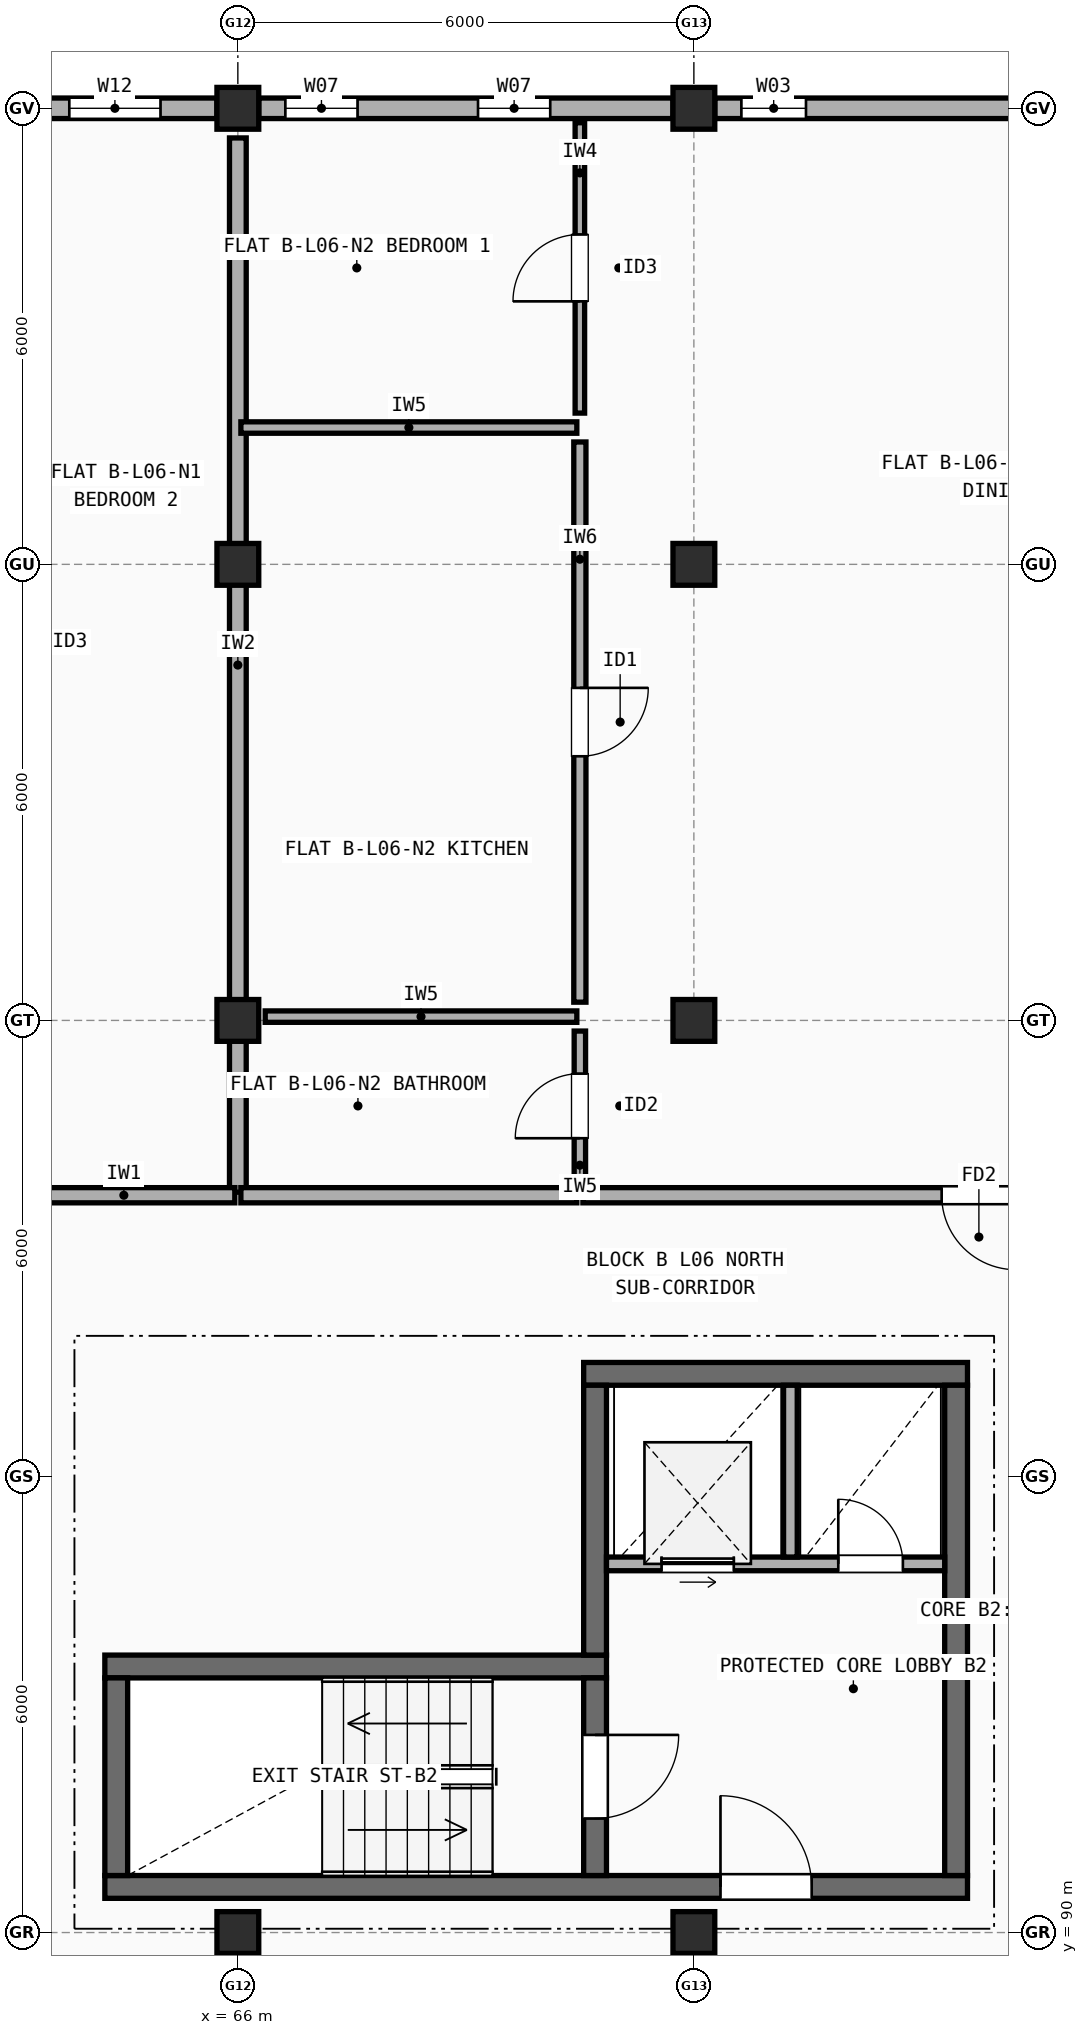
"""IFC4 building model, lengths in metres.
Left out: names, types, materials, properties, quantities, classifications, styles, units other than length and angle.
Written with IfcOpenShell. Run it as: python <this file> out.ifc"""

import sys

from ifc_helpers import new_model, si_unit, direction, frame, frame_2d, origin, origin_2d, place, context, subcontext, project, spatial, rectangle, extrude, element, fill, save


model = new_model("IFC4")
c1 = context("Model", 3, precision=1e-05, world=origin(), true_north=direction((0.0, 1.0)))
c2 = subcontext(c1, "Body", "Model", "MODEL_VIEW")
j1 = project(units=[si_unit("LENGTHUNIT", "METRE"), si_unit("PLANEANGLEUNIT", "RADIAN")], contexts=[c1])
p1 = place(None, origin())
s1 = spatial("IfcSite", under=j1, at=p1, CompositionType="ELEMENT")
p2 = place(p1, origin())
s2 = spatial("IfcBuilding", under=s1, at=p2, CompositionType="ELEMENT")
p3 = place(p2, frame((0.0, 0.0, 20.5)))
s3 = spatial("IfcBuildingStorey", under=s2, at=p3, CompositionType="ELEMENT", Elevation=20.5)
for number, where, z_axis, x_axis in (
    (1, (66.0, 90.0, 0.0), (0.0, 0.0, 1.0), (1.0, 0.0, 0.0)),
    (2, (66.0, 102.0, 0.0), (0.0, 0.0, 1.0), (1.0, 0.0, 0.0)),
    (3, (66.0, 108.0, 0.0), (0.0, 0.0, 1.0), (1.0, 0.0, 0.0)),
    (4, (66.0, 114.0, 0.0), (0.0, 0.0, 1.0), (1.0, 0.0, 0.0)),
    (5, (72.0, 90.0, 0.0), (0.0, 0.0, 1.0), (1.0, 0.0, 0.0)),
    (6, (72.0, 102.0, 0.0), (0.0, 0.0, 1.0), (1.0, 0.0, 0.0)),
    (7, (72.0, 108.0, 0.0), (0.0, 0.0, 1.0), (1.0, 0.0, 0.0)),
    (8, (72.0, 114.0, 0.0), (0.0, 0.0, 1.0), (1.0, 0.0, 0.0)),
):
    element("IfcColumn", number, at=place(p3, frame(where, z_axis=z_axis, x_axis=x_axis)), inside=s3, PredefinedType="COLUMN", context=c2, shape_type="SweptSolid", body=[
        extrude(rectangle(XDim=0.55, YDim=0.55, at=origin_2d()), origin(), (0.0, 0.0, 1.0), 2.97),
    ])
p4 = place(p3, frame((77.75, 114.0, 0.0), z_axis=(0.0, 0.0, 1.0), x_axis=(-1.0, 0.0, 0.0)))
e9 = element("IfcWall", 9, at=p4, inside=s3, PredefinedType="STANDARD", context=c2, shape_type="SweptSolid", body=[
    extrude(rectangle(XDim=5.475, YDim=0.27, at=frame_2d((2.738, 0.0))), origin(), (0.0, 0.0, 1.0), 2.452),
])
p5 = place(p4, frame((0.35, 0.0, 0.9)))
e10 = element("IfcOpeningElement", 10, at=p5, cuts=e9, PredefinedType="OPENING", context=c2, shape_type="SweptSolid", body=[
    extrude(rectangle(XDim=0.85, YDim=1.25, at=frame_2d((0.425, 0.625))), frame((0.0, 0.145, 0.0), z_axis=(0.0, -1.0, 0.0), x_axis=(1.0, 0.0, 0.0)), (0.0, 0.0, 1.0), 0.29),
])
p6 = place(p4, frame((4.275, 0.0, 0.9)))
e11 = element("IfcOpeningElement", 11, at=p6, cuts=e9, PredefinedType="OPENING", context=c2, shape_type="SweptSolid", body=[
    extrude(rectangle(XDim=0.85, YDim=1.25, at=frame_2d((0.425, 0.625))), frame((0.0, 0.145, 0.0), z_axis=(0.0, -1.0, 0.0), x_axis=(1.0, 0.0, 0.0)), (0.0, 0.0, 1.0), 0.29),
])
p7 = place(p3, frame((71.725, 114.0, 0.0), z_axis=(0.0, 0.0, 1.0), x_axis=(-1.0, 0.0, 0.0)))
e12 = element("IfcWall", 12, at=p7, inside=s3, PredefinedType="STANDARD", context=c2, shape_type="SweptSolid", body=[
    extrude(rectangle(XDim=5.45, YDim=0.27, at=frame_2d((2.725, 0.0))), origin(), (0.0, 0.0, 1.0), 2.452),
])
p8 = place(p7, frame((1.615, 0.0, 0.9)))
e13 = element("IfcOpeningElement", 13, at=p8, cuts=e12, PredefinedType="OPENING", context=c2, shape_type="SweptSolid", body=[
    extrude(rectangle(XDim=0.95, YDim=1.35, at=frame_2d((0.475, 0.675))), frame((0.0, 0.145, 0.0), z_axis=(0.0, -1.0, 0.0), x_axis=(1.0, 0.0, 0.0)), (0.0, 0.0, 1.0), 0.29),
])
p9 = place(p7, frame((4.15, 0.0, 0.9)))
e14 = element("IfcOpeningElement", 14, at=p9, cuts=e12, PredefinedType="OPENING", context=c2, shape_type="SweptSolid", body=[
    extrude(rectangle(XDim=0.95, YDim=1.35, at=frame_2d((0.475, 0.675))), frame((0.0, 0.145, 0.0), z_axis=(0.0, -1.0, 0.0), x_axis=(1.0, 0.0, 0.0)), (0.0, 0.0, 1.0), 0.29),
])
p10 = place(p3, frame((65.725, 114.0, 0.0), z_axis=(0.0, 0.0, 1.0), x_axis=(-1.0, 0.0, 0.0)))
e15 = element("IfcWall", 15, at=p10, inside=s3, PredefinedType="STANDARD", context=c2, shape_type="SweptSolid", body=[
    extrude(rectangle(XDim=5.45, YDim=0.27, at=frame_2d((2.725, 0.0))), origin(), (0.0, 0.0, 1.0), 2.452),
])
p11 = place(p10, frame((0.742, 0.0, 0.9)))
e16 = element("IfcOpeningElement", 16, at=p11, cuts=e15, PredefinedType="OPENING", context=c2, shape_type="SweptSolid", body=[
    extrude(rectangle(XDim=1.2, YDim=1.35, at=frame_2d((0.6, 0.675))), frame((0.0, 0.145, 0.0), z_axis=(0.0, -1.0, 0.0), x_axis=(1.0, 0.0, 0.0)), (0.0, 0.0, 1.0), 0.29),
])
p12 = place(p10, frame((3.708, 0.0, 0.9)))
e17 = element("IfcOpeningElement", 17, at=p12, cuts=e15, PredefinedType="OPENING", context=c2, shape_type="SweptSolid", body=[
    extrude(rectangle(XDim=0.8, YDim=1.2, at=frame_2d((0.4, 0.6))), frame((0.0, 0.145, 0.0), z_axis=(0.0, -1.0, 0.0), x_axis=(1.0, 0.0, 0.0)), (0.0, 0.0, 1.0), 0.29),
])
p13 = place(p3, frame((64.25, 90.6, 0.0), z_axis=(0.0, 0.0, 1.0), x_axis=(1.0, 0.0, 0.0)))
e18 = element("IfcWall", 18, at=p13, inside=s3, PredefinedType="SHEAR", context=c2, shape_type="SweptSolid", body=[
    extrude(rectangle(XDim=11.35, YDim=0.3, at=frame_2d((5.675, 0.0))), origin(), (0.0, 0.0, 1.0), 2.97),
])
p14 = place(p13, frame((8.1, 0.0, 0.0)))
e19 = element("IfcOpeningElement", 19, at=p14, cuts=e18, PredefinedType="OPENING", context=c2, shape_type="SweptSolid", body=[
    extrude(rectangle(XDim=1.2, YDim=2.15, at=frame_2d((0.6, 1.075))), frame((0.0, 0.16, 0.0), z_axis=(0.0, -1.0, 0.0), x_axis=(1.0, 0.0, 0.0)), (0.0, 0.0, 1.0), 0.32),
])
p15 = place(p3, frame((70.85, 93.5, 0.0), z_axis=(0.0, 0.0, 1.0), x_axis=(-1.0, 0.0, 0.0)))
e20 = element("IfcWall", 20, at=p15, inside=s3, PredefinedType="SHEAR", context=c2, shape_type="SweptSolid", body=[
    extrude(rectangle(XDim=6.6, YDim=0.3, at=frame_2d((3.3, 0.0))), origin(), (0.0, 0.0, 1.0), 2.97),
])
p16 = place(p3, frame((64.4, 93.35, 0.0), z_axis=(0.0, 0.0, 1.0), x_axis=(0.0, -1.0, 0.0)))
e21 = element("IfcWall", 21, at=p16, inside=s3, PredefinedType="SHEAR", context=c2, shape_type="SweptSolid", body=[
    extrude(rectangle(XDim=2.6, YDim=0.3, at=frame_2d((1.3, 0.0))), origin(), (0.0, 0.0, 1.0), 2.97),
])
p17 = place(p3, frame((70.7, 90.75, 0.0), z_axis=(0.0, 0.0, 1.0), x_axis=(0.0, 1.0, 0.0)))
e22 = element("IfcWall", 22, at=p17, inside=s3, PredefinedType="SHEAR", context=c2, shape_type="SweptSolid", body=[
    extrude(rectangle(XDim=2.6, YDim=0.3, at=frame_2d((1.3, 0.0))), origin(), (0.0, 0.0, 1.0), 2.97),
])
p18 = place(p17, frame((0.75, 0.0, 0.0)))
e23 = element("IfcOpeningElement", 23, at=p18, cuts=e22, PredefinedType="OPENING", context=c2, shape_type="SweptSolid", body=[
    extrude(rectangle(XDim=1.1, YDim=2.15, at=frame_2d((0.55, 1.075))), frame((0.0, 0.16, 0.0), z_axis=(0.0, -1.0, 0.0), x_axis=(1.0, 0.0, 0.0)), (0.0, 0.0, 1.0), 0.32),
])
p19 = place(p3, frame((75.6, 97.35, 0.0), z_axis=(0.0, 0.0, 1.0), x_axis=(-1.0, 0.0, 0.0)))
e24 = element("IfcWall", 24, at=p19, inside=s3, PredefinedType="SHEAR", context=c2, shape_type="SweptSolid", body=[
    extrude(rectangle(XDim=5.05, YDim=0.3, at=frame_2d((2.525, 0.0))), origin(), (0.0, 0.0, 1.0), 2.97),
])
p20 = place(p3, frame((75.45, 90.75, 0.0), z_axis=(0.0, 0.0, 1.0), x_axis=(0.0, 1.0, 0.0)))
e25 = element("IfcWall", 25, at=p20, inside=s3, PredefinedType="SHEAR", context=c2, shape_type="SweptSolid", body=[
    extrude(rectangle(XDim=6.45, YDim=0.3, at=frame_2d((3.225, 0.0))), origin(), (0.0, 0.0, 1.0), 2.97),
])
p21 = place(p3, frame((70.7, 93.65, 0.0), z_axis=(0.0, 0.0, 1.0), x_axis=(0.0, 1.0, 0.0)))
e26 = element("IfcWall", 26, at=p21, inside=s3, PredefinedType="SHEAR", context=c2, shape_type="SweptSolid", body=[
    extrude(rectangle(XDim=3.55, YDim=0.3, at=frame_2d((1.775, 0.0))), origin(), (0.0, 0.0, 1.0), 2.97),
])
p22 = place(p3, frame((70.85, 94.85, 0.0), z_axis=(0.0, 0.0, 1.0), x_axis=(1.0, 0.0, 0.0)))
e27 = element("IfcWall", 27, at=p22, inside=s3, PredefinedType="SOLIDWALL", context=c2, shape_type="SweptSolid", body=[
    extrude(rectangle(XDim=4.45, YDim=0.18, at=frame_2d((2.225, 0.0))), origin(), (0.0, 0.0, 1.0), 2.97),
])
p23 = place(p22, frame((0.725, 0.0, 0.0)))
e28 = element("IfcOpeningElement", 28, at=p23, cuts=e27, PredefinedType="OPENING", context=c2, shape_type="SweptSolid", body=[
    extrude(rectangle(XDim=0.95, YDim=2.15, at=frame_2d((0.475, 1.075))), frame((0.0, 0.1, 0.0), z_axis=(0.0, -1.0, 0.0), x_axis=(1.0, 0.0, 0.0)), (0.0, 0.0, 1.0), 0.2),
])
p24 = place(p22, frame((3.05, 0.0, 0.0)))
e29 = element("IfcOpeningElement", 29, at=p24, cuts=e27, PredefinedType="OPENING", context=c2, shape_type="SweptSolid", body=[
    extrude(rectangle(XDim=0.85, YDim=2.1, at=frame_2d((0.425, 1.05))), frame((0.0, 0.1, 0.0), z_axis=(0.0, -1.0, 0.0), x_axis=(1.0, 0.0, 0.0)), (0.0, 0.0, 1.0), 0.2),
])
p25 = place(p3, frame((73.27, 94.94, 0.0), z_axis=(0.0, 0.0, 1.0), x_axis=(0.0, 1.0, 0.0)))
e30 = element("IfcWall", 30, at=p25, inside=s3, PredefinedType="SOLIDWALL", context=c2, shape_type="SweptSolid", body=[
    extrude(rectangle(XDim=2.26, YDim=0.18, at=frame_2d((1.13, 0.0))), origin(), (0.0, 0.0, 1.0), 2.97),
])
p26 = place(p3, frame((66.0, 99.74, 0.0), z_axis=(0.0, 0.0, 1.0), x_axis=(0.0, 1.0, 0.0)))
e31 = element("IfcWall", 31, at=p26, inside=s3, PredefinedType="SOLIDWALL", context=c2, shape_type="SweptSolid", body=[
    extrude(rectangle(XDim=13.87, YDim=0.22, at=frame_2d((6.935, 0.0))), origin(), (0.0, 0.0, 1.0), 2.508),
])
p27 = place(p3, frame((63.04, 99.7, 0.0), z_axis=(0.0, 0.0, 1.0), x_axis=(1.0, 0.0, 0.0)))
e32 = element("IfcWall", 32, at=p27, inside=s3, PredefinedType="SOLIDWALL", context=c2, shape_type="SweptSolid", body=[
    extrude(rectangle(XDim=2.92, YDim=0.2, at=frame_2d((1.46, 0.0))), origin(), (0.0, 0.0, 1.0), 2.97),
])
p28 = place(p3, frame((66.04, 99.7, 0.0), z_axis=(0.0, 0.0, 1.0), x_axis=(1.0, 0.0, 0.0)))
e33 = element("IfcWall", 33, at=p28, inside=s3, PredefinedType="SOLIDWALL", context=c2, shape_type="SweptSolid", body=[
    extrude(rectangle(XDim=4.42, YDim=0.2, at=frame_2d((2.21, 0.0))), origin(), (0.0, 0.0, 1.0), 2.97),
])
p29 = place(p3, frame((70.54, 99.7, 0.0), z_axis=(0.0, 0.0, 1.0), x_axis=(1.0, 0.0, 0.0)))
e34 = element("IfcWall", 34, at=p29, inside=s3, PredefinedType="SOLIDWALL", context=c2, shape_type="SweptSolid", body=[
    extrude(rectangle(XDim=10.42, YDim=0.2, at=frame_2d((5.21, 0.0))), origin(), (0.0, 0.0, 1.0), 2.452),
])
p30 = place(p29, frame((4.72, 0.0, 0.0)))
e35 = element("IfcOpeningElement", 35, at=p30, cuts=e34, PredefinedType="OPENING", context=c2, shape_type="SweptSolid", body=[
    extrude(rectangle(XDim=0.98, YDim=2.15, at=frame_2d((0.49, 1.075))), frame((0.0, 0.11, 0.0), z_axis=(0.0, -1.0, 0.0), x_axis=(1.0, 0.0, 0.0)), (0.0, 0.0, 1.0), 0.22),
])
p31 = place(p3, frame((70.5, 109.99, 0.0), z_axis=(0.0, 0.0, 1.0), x_axis=(0.0, 1.0, 0.0)))
e36 = element("IfcWall", 36, at=p31, inside=s3, PredefinedType="PARTITIONING", context=c2, shape_type="SweptSolid", body=[
    extrude(rectangle(XDim=3.82, YDim=0.125, at=frame_2d((1.91, 0.0))), origin(), (0.0, 0.0, 1.0), 2.97),
])
p32 = place(p31, frame((1.47, 0.0, 0.0)))
e37 = element("IfcOpeningElement", 37, at=p32, cuts=e36, PredefinedType="OPENING", context=c2, shape_type="SweptSolid", body=[
    extrude(rectangle(XDim=0.88, YDim=2.1, at=frame_2d((0.44, 1.05))), frame((0.0, 0.073, 0.0), z_axis=(0.0, -1.0, 0.0), x_axis=(1.0, 0.0, 0.0)), (0.0, 0.0, 1.0), 0.145),
])
p33 = place(p3, frame((70.5, 102.24, 0.0), z_axis=(0.0, 0.0, 1.0), x_axis=(0.0, 1.0, 0.0)))
e38 = element("IfcWall", 38, at=p33, inside=s3, PredefinedType="PLUMBINGWALL", context=c2, shape_type="SweptSolid", body=[
    extrude(rectangle(XDim=7.37, YDim=0.16, at=frame_2d((3.685, 0.0))), origin(), (0.0, 0.0, 1.0), 2.452),
])
p34 = place(p33, frame((3.235, 0.0, 0.0)))
e39 = element("IfcOpeningElement", 39, at=p34, cuts=e38, PredefinedType="OPENING", context=c2, shape_type="SweptSolid", body=[
    extrude(rectangle(XDim=0.9, YDim=2.1, at=frame_2d((0.45, 1.05))), frame((0.0, 0.09, 0.0), z_axis=(0.0, -1.0, 0.0), x_axis=(1.0, 0.0, 0.0)), (0.0, 0.0, 1.0), 0.18),
])
p35 = place(p3, frame((70.5, 99.89, 0.0), z_axis=(0.0, 0.0, 1.0), x_axis=(0.0, 1.0, 0.0)))
e40 = element("IfcWall", 40, at=p35, inside=s3, PredefinedType="PARTITIONING", context=c2, shape_type="SweptSolid", body=[
    extrude(rectangle(XDim=1.97, YDim=0.15, at=frame_2d((0.985, 0.0))), origin(), (0.0, 0.0, 1.0), 2.97),
])
p36 = place(p35, frame((0.56, 0.0, 0.0)))
e41 = element("IfcOpeningElement", 41, at=p36, cuts=e40, PredefinedType="OPENING", context=c2, shape_type="SweptSolid", body=[
    extrude(rectangle(XDim=0.85, YDim=2.1, at=frame_2d((0.425, 1.05))), frame((0.0, 0.085, 0.0), z_axis=(0.0, -1.0, 0.0), x_axis=(1.0, 0.0, 0.0)), (0.0, 0.0, 1.0), 0.17),
])
p37 = place(p3, frame((66.04, 109.8, 0.0), z_axis=(0.0, 0.0, 1.0), x_axis=(1.0, 0.0, 0.0)))
e42 = element("IfcWall", 42, at=p37, inside=s3, PredefinedType="PARTITIONING", context=c2, shape_type="SweptSolid", body=[
    extrude(rectangle(XDim=4.42, YDim=0.15, at=frame_2d((2.21, 0.0))), origin(), (0.0, 0.0, 1.0), 2.508),
])
p38 = place(p3, frame((66.36, 102.05, 0.0), z_axis=(0.0, 0.0, 1.0), x_axis=(1.0, 0.0, 0.0)))
e43 = element("IfcWall", 43, at=p38, inside=s3, PredefinedType="PARTITIONING", context=c2, shape_type="SweptSolid", body=[
    extrude(rectangle(XDim=4.1, YDim=0.15, at=frame_2d((2.05, 0.0))), origin(), (0.0, 0.0, 1.0), 2.452),
])
p39 = place(p6, origin())
e44 = element("IfcWindow", 44, at=p39, inside=s3, PartitioningType="SINGLE_PANEL", PredefinedType="WINDOW", context=c2, shape_type="SweptSolid", body=[
    extrude(rectangle(XDim=0.85, YDim=1.25, at=frame_2d((0.425, 0.625))), frame((0.0, 0.03, 0.0), z_axis=(0.0, -1.0, 0.0), x_axis=(1.0, 0.0, 0.0)), (0.0, 0.0, 1.0), 0.06),
])
fill(e11, e44)
p40 = place(p8, origin())
e45 = element("IfcWindow", 45, at=p40, inside=s3, PartitioningType="SINGLE_PANEL", PredefinedType="WINDOW", context=c2, shape_type="SweptSolid", body=[
    extrude(rectangle(XDim=0.95, YDim=1.35, at=frame_2d((0.475, 0.675))), frame((0.0, 0.03, 0.0), z_axis=(0.0, -1.0, 0.0), x_axis=(1.0, 0.0, 0.0)), (0.0, 0.0, 1.0), 0.06),
])
fill(e13, e45)
p41 = place(p9, origin())
e46 = element("IfcWindow", 46, at=p41, inside=s3, PartitioningType="SINGLE_PANEL", PredefinedType="WINDOW", context=c2, shape_type="SweptSolid", body=[
    extrude(rectangle(XDim=0.95, YDim=1.35, at=frame_2d((0.475, 0.675))), frame((0.0, 0.03, 0.0), z_axis=(0.0, -1.0, 0.0), x_axis=(1.0, 0.0, 0.0)), (0.0, 0.0, 1.0), 0.06),
])
fill(e14, e46)
p42 = place(p11, origin())
e47 = element("IfcWindow", 47, at=p42, inside=s3, PartitioningType="SINGLE_PANEL", PredefinedType="WINDOW", context=c2, shape_type="SweptSolid", body=[
    extrude(rectangle(XDim=1.2, YDim=1.35, at=frame_2d((0.6, 0.675))), frame((0.0, 0.03, 0.0), z_axis=(0.0, -1.0, 0.0), x_axis=(1.0, 0.0, 0.0)), (0.0, 0.0, 1.0), 0.06),
])
fill(e16, e47)
p43 = place(p14, origin())
e48 = element("IfcDoor", 48, at=p43, inside=s3, OperationType="SINGLE_SWING_LEFT", PredefinedType="DOOR", context=c2, shape_type="SweptSolid", body=[
    extrude(rectangle(XDim=1.2, YDim=2.15, at=frame_2d((0.6, 1.075))), frame((0.0, 0.025, 0.0), z_axis=(0.0, -1.0, 0.0), x_axis=(1.0, 0.0, 0.0)), (0.0, 0.0, 1.0), 0.05),
])
fill(e19, e48)
p44 = place(p18, origin())
e49 = element("IfcDoor", 49, at=p44, inside=s3, OperationType="SINGLE_SWING_RIGHT", PredefinedType="DOOR", context=c2, shape_type="SweptSolid", body=[
    extrude(rectangle(XDim=1.1, YDim=2.15, at=frame_2d((0.55, 1.075))), frame((0.0, 0.025, 0.0), z_axis=(0.0, -1.0, 0.0), x_axis=(1.0, 0.0, 0.0)), (0.0, 0.0, 1.0), 0.05),
])
fill(e23, e49)
p45 = place(p23, origin())
e50 = element("IfcDoor", 50, at=p45, inside=s3, OperationType="SLIDING_TO_LEFT", PredefinedType="DOOR", context=c2, shape_type="SweptSolid", body=[
    extrude(rectangle(XDim=0.95, YDim=2.15, at=frame_2d((0.475, 1.075))), frame((0.0, 0.025, 0.0), z_axis=(0.0, -1.0, 0.0), x_axis=(1.0, 0.0, 0.0)), (0.0, 0.0, 1.0), 0.05),
])
fill(e28, e50)
p46 = place(p24, frame((0.85, 0.0, 0.0), z_axis=(0.0, 0.0, 1.0), x_axis=(-1.0, 0.0, 0.0)))
e51 = element("IfcDoor", 51, at=p46, inside=s3, OperationType="SINGLE_SWING_LEFT", PredefinedType="DOOR", context=c2, shape_type="SweptSolid", body=[
    extrude(rectangle(XDim=0.85, YDim=2.1, at=frame_2d((0.425, 1.05))), frame((0.0, 0.025, 0.0), z_axis=(0.0, -1.0, 0.0), x_axis=(1.0, 0.0, 0.0)), (0.0, 0.0, 1.0), 0.05),
])
fill(e29, e51)
p47 = place(p30, origin())
e52 = element("IfcDoor", 52, at=p47, inside=s3, OperationType="SINGLE_SWING_RIGHT", PredefinedType="DOOR", context=c2, shape_type="SweptSolid", body=[
    extrude(rectangle(XDim=0.98, YDim=2.15, at=frame_2d((0.49, 1.075))), frame((0.0, 0.025, 0.0), z_axis=(0.0, -1.0, 0.0), x_axis=(1.0, 0.0, 0.0)), (0.0, 0.0, 1.0), 0.05),
])
fill(e35, e52)
p48 = place(p32, origin())
e53 = element("IfcDoor", 53, at=p48, inside=s3, OperationType="SINGLE_SWING_LEFT", PredefinedType="DOOR", context=c2, shape_type="SweptSolid", body=[
    extrude(rectangle(XDim=0.88, YDim=2.1, at=frame_2d((0.44, 1.05))), frame((0.0, 0.025, 0.0), z_axis=(0.0, -1.0, 0.0), x_axis=(1.0, 0.0, 0.0)), (0.0, 0.0, 1.0), 0.05),
])
fill(e37, e53)
p49 = place(p34, origin())
e54 = element("IfcDoor", 54, at=p49, inside=s3, OperationType="SINGLE_SWING_RIGHT", PredefinedType="DOOR", context=c2, shape_type="SweptSolid", body=[
    extrude(rectangle(XDim=0.9, YDim=2.1, at=frame_2d((0.45, 1.05))), frame((0.0, 0.025, 0.0), z_axis=(0.0, -1.0, 0.0), x_axis=(1.0, 0.0, 0.0)), (0.0, 0.0, 1.0), 0.05),
])
fill(e39, e54)
p50 = place(p36, origin())
e55 = element("IfcDoor", 55, at=p50, inside=s3, OperationType="SINGLE_SWING_LEFT", PredefinedType="DOOR", context=c2, shape_type="SweptSolid", body=[
    extrude(rectangle(XDim=0.85, YDim=2.1, at=frame_2d((0.425, 1.05))), frame((0.0, 0.025, 0.0), z_axis=(0.0, -1.0, 0.0), x_axis=(1.0, 0.0, 0.0)), (0.0, 0.0, 1.0), 0.05),
])
fill(e41, e55)
save(model, sys.argv[1])
